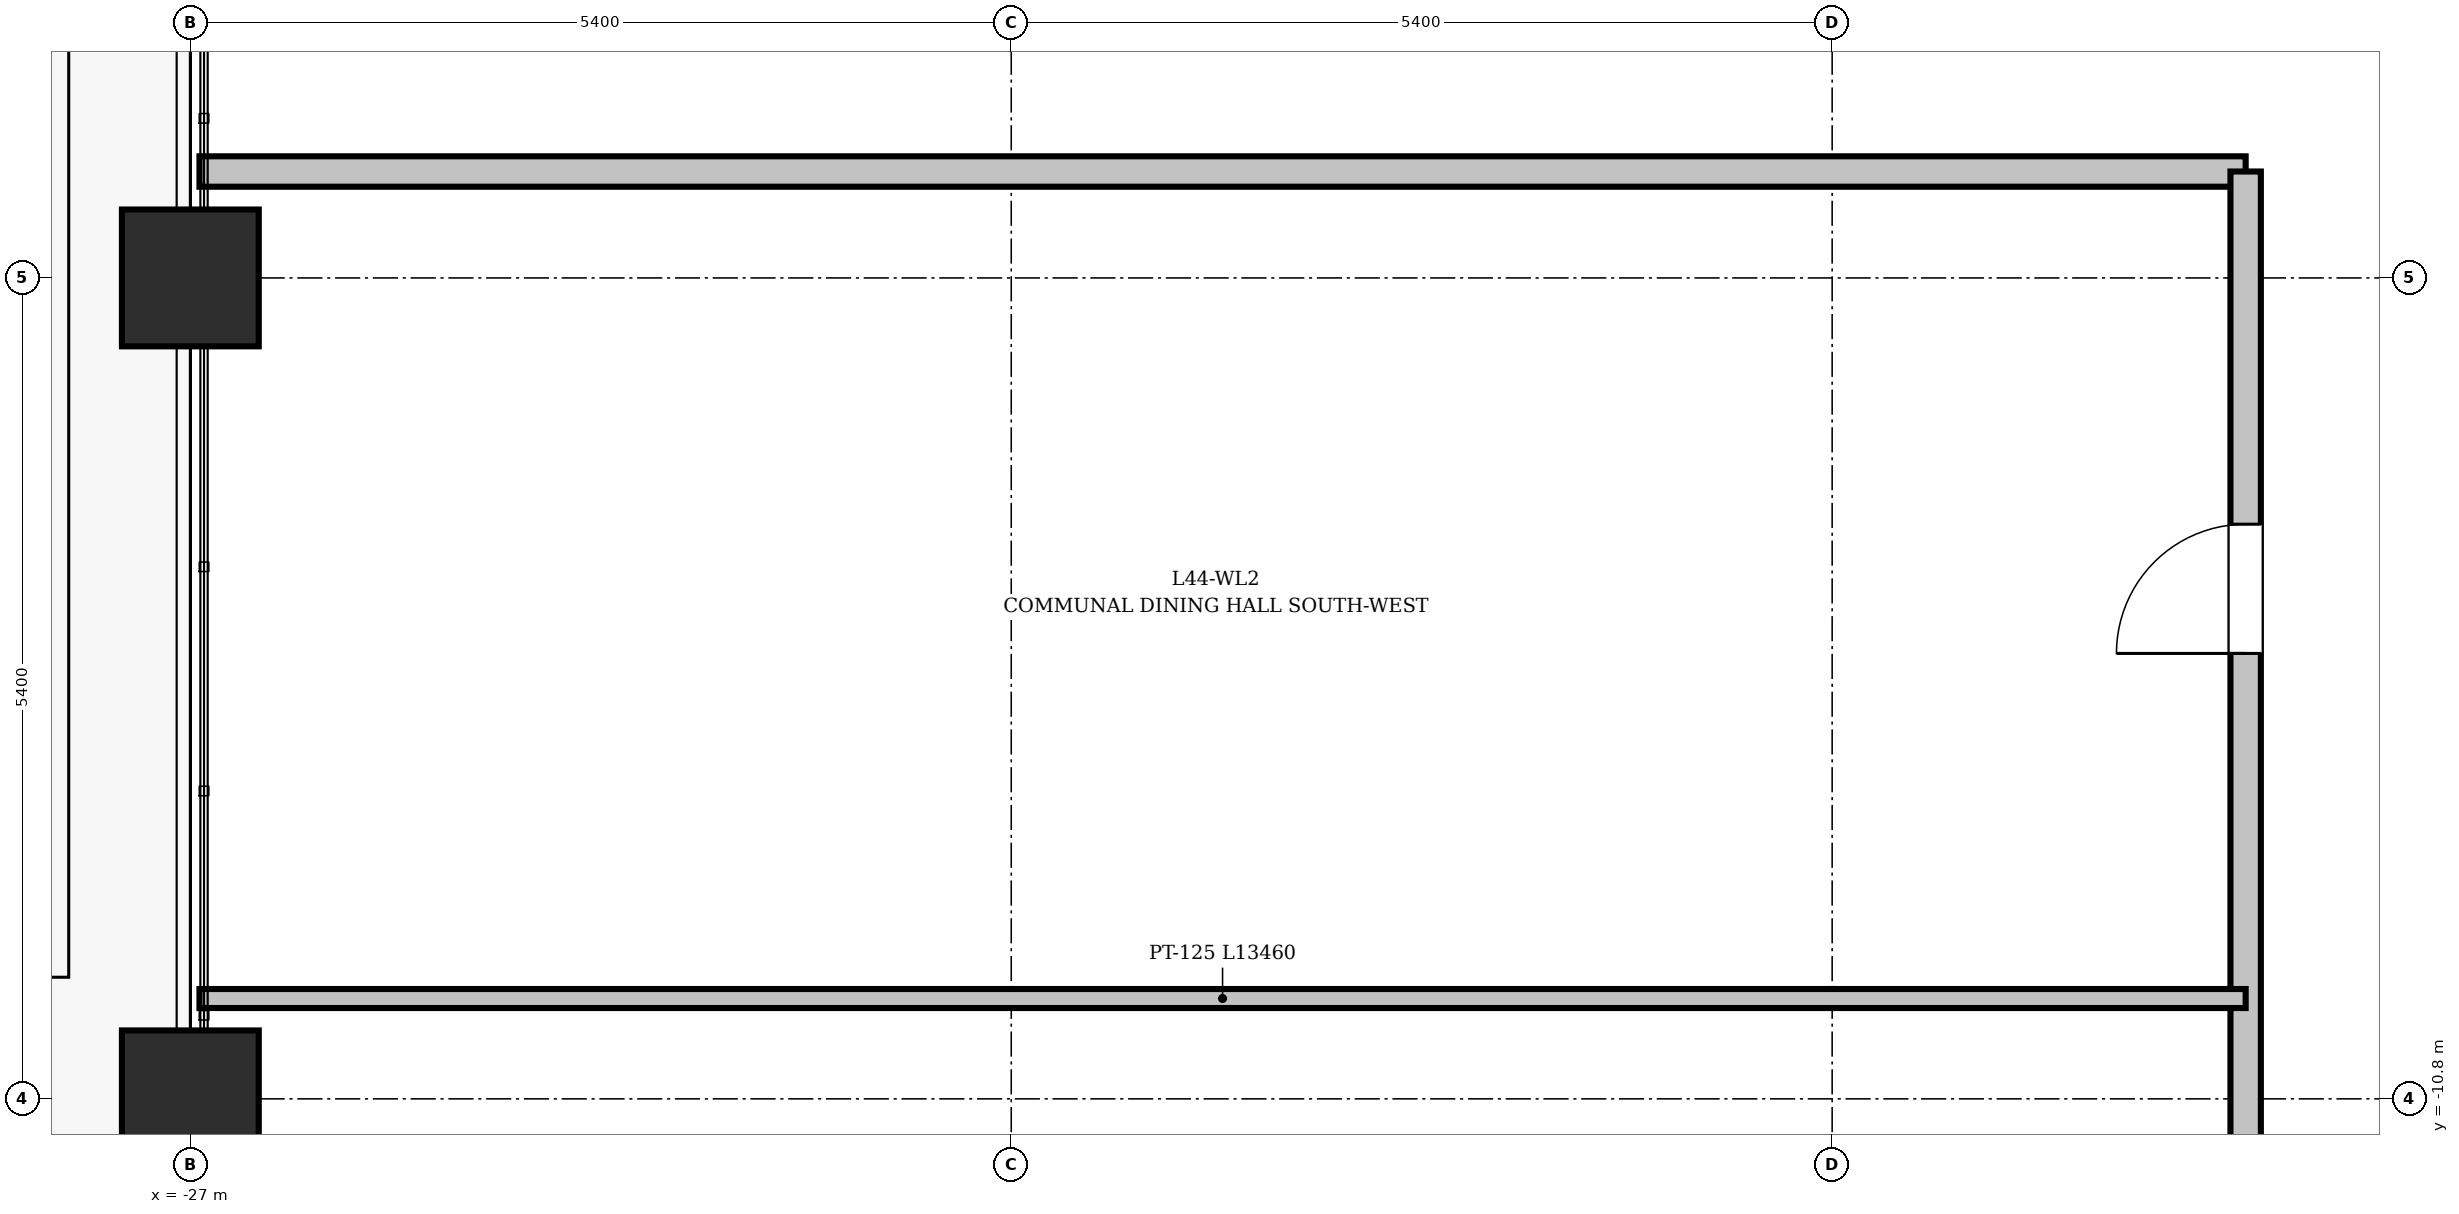
"""IFC4 building model, lengths in metres.
Left out: names, types, materials, properties, quantities, classifications, styles, units other than length and angle.
Written with IfcOpenShell. Run it as: python <this file> out.ifc"""

import sys

from ifc_helpers import new_model, si_unit, direction, frame, frame_2d, origin, origin_2d, place, context, subcontext, project, spatial, rectangle, extrude, element, fill, save


model = new_model("IFC4")
c1 = context("Model", 3, precision=1e-05, world=origin(), true_north=direction((0.0, 1.0)))
c2 = subcontext(c1, "Body", "Model", "MODEL_VIEW")
j1 = project(units=[si_unit("LENGTHUNIT", "METRE"), si_unit("PLANEANGLEUNIT", "RADIAN")], contexts=[c1])
p1 = place(None, origin())
s1 = spatial("IfcSite", under=j1, at=p1, CompositionType="ELEMENT")
p2 = place(p1, origin())
s2 = spatial("IfcBuilding", under=s1, at=p2, CompositionType="ELEMENT")
p3 = place(p2, frame((0.0, 0.0, 171.0)))
s3 = spatial("IfcBuildingStorey", under=s2, at=p3, CompositionType="ELEMENT", Elevation=171.0)
for number, where, z_axis, x_axis in (
    (1, (-27.0, -10.8, 0.0), (0.0, 0.0, 1.0), (1.0, 0.0, 0.0)),
    (2, (-27.0, -5.4, 0.0), (0.0, 0.0, 1.0), (1.0, 0.0, 0.0)),
):
    element("IfcColumn", number, at=place(p3, frame(where, z_axis=z_axis, x_axis=x_axis)), inside=s3, PredefinedType="COLUMN", context=c2, shape_type="SweptSolid", body=[
        extrude(rectangle(XDim=0.9, YDim=0.9, at=origin_2d()), origin(), (0.0, 0.0, 1.0), 3.75),
    ])
p4 = place(p3, frame((-26.94, -4.7, 0.0), z_axis=(0.0, 0.0, 1.0), x_axis=(1.0, 0.0, 0.0)))
e3 = element("IfcWall", 3, at=p4, inside=s3, PredefinedType="PARTITIONING", context=c2, shape_type="SweptSolid", body=[
    extrude(rectangle(XDim=13.46, YDim=0.2, at=frame_2d((6.73, 0.0))), origin(), (0.0, 0.0, 1.0), 2.78),
])
p5 = place(p3, frame((-13.48, -13.48, 0.0), z_axis=(0.0, 0.0, 1.0), x_axis=(0.0, 1.0, 0.0)))
e4 = element("IfcWall", 4, at=p5, inside=s3, PredefinedType="PARTITIONING", context=c2, shape_type="SweptSolid", body=[
    extrude(rectangle(XDim=8.78, YDim=0.2, at=frame_2d((4.39, 0.0))), origin(), (0.0, 0.0, 1.0), 3.006),
])
p6 = place(p5, frame((1.22, 0.0, 0.0)))
e5 = element("IfcOpeningElement", 5, at=p6, cuts=e4, PredefinedType="OPENING", context=c2, shape_type="SweptSolid", body=[
    extrude(rectangle(XDim=0.85, YDim=2.1, at=frame_2d((0.425, 1.05))), frame((0.0, 0.11, 0.0), z_axis=(0.0, -1.0, 0.0), x_axis=(1.0, 0.0, 0.0)), (0.0, 0.0, 1.0), 0.22),
])
p7 = place(p5, frame((5.61, 0.0, 0.0)))
e6 = element("IfcOpeningElement", 6, at=p7, cuts=e4, PredefinedType="OPENING", context=c2, shape_type="SweptSolid", body=[
    extrude(rectangle(XDim=0.85, YDim=2.1, at=frame_2d((0.425, 1.05))), frame((0.0, 0.11, 0.0), z_axis=(0.0, -1.0, 0.0), x_axis=(1.0, 0.0, 0.0)), (0.0, 0.0, 1.0), 0.22),
])
p8 = place(p3, frame((-26.94, -10.14, 0.0), z_axis=(0.0, 0.0, 1.0), x_axis=(1.0, 0.0, 0.0)))
e7 = element("IfcWall", 7, at=p8, inside=s3, PredefinedType="PARTITIONING", context=c2, shape_type="SweptSolid", body=[
    extrude(rectangle(XDim=13.46, YDim=0.125, at=frame_2d((6.73, 0.0))), origin(), (0.0, 0.0, 1.0), 2.78),
])
p9 = place(p7, origin())
e8 = element("IfcDoor", 8, at=p9, inside=s3, OperationType="SINGLE_SWING_LEFT", PredefinedType="DOOR", context=c2, shape_type="SweptSolid", body=[
    extrude(rectangle(XDim=0.85, YDim=2.1, at=frame_2d((0.425, 1.05))), frame((0.0, 0.025, 0.0), z_axis=(0.0, -1.0, 0.0), x_axis=(1.0, 0.0, 0.0)), (0.0, 0.0, 1.0), 0.05),
])
fill(e6, e8)
save(model, sys.argv[1])
